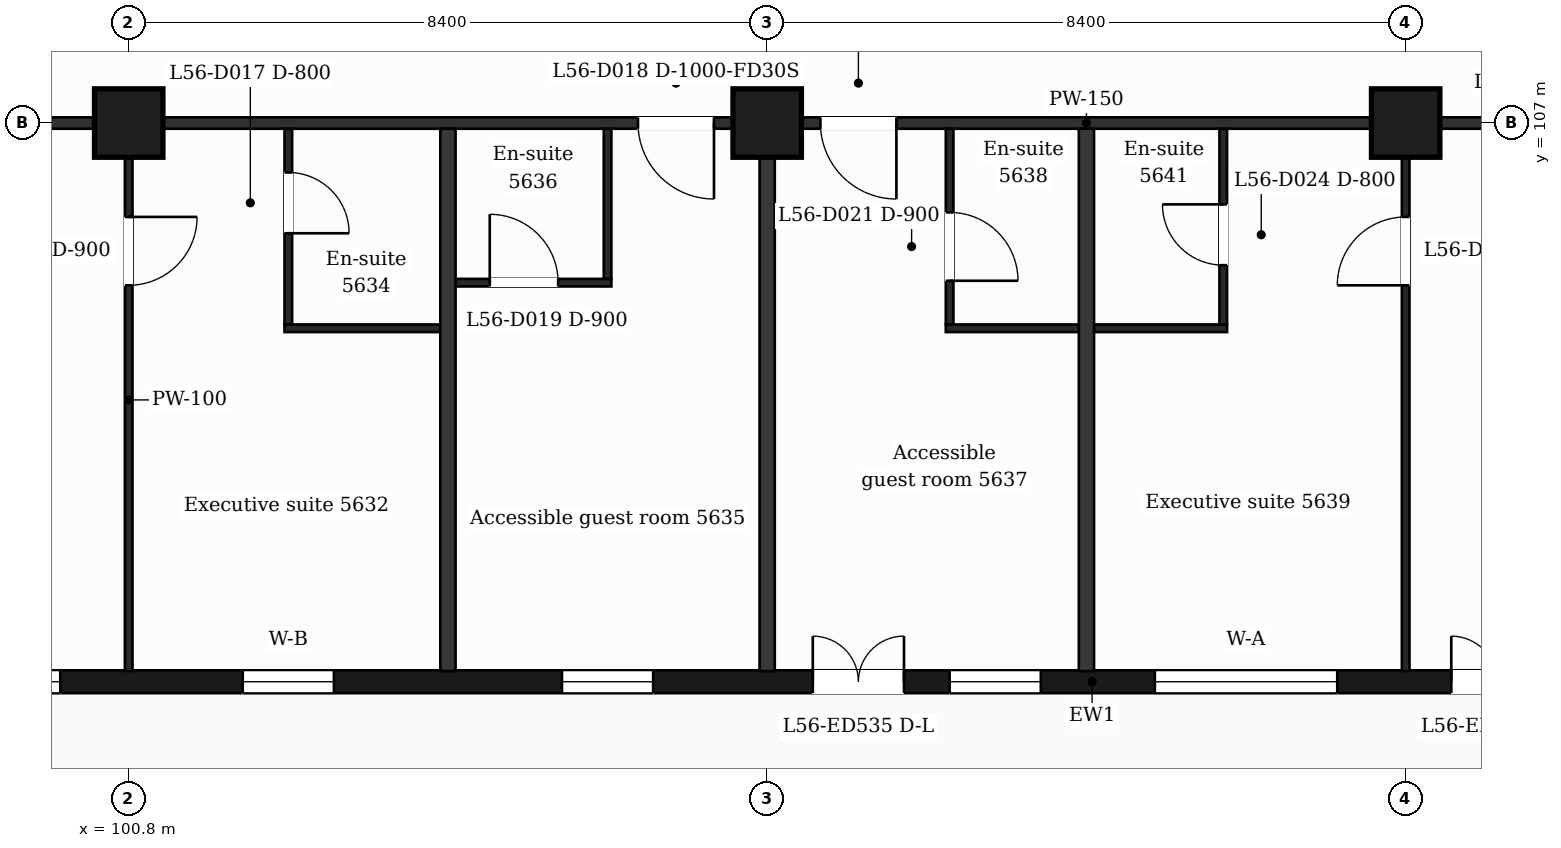
"""IFC4 building model, lengths in metres.
Left out: names, types, materials, properties, quantities, classifications, styles, units other than length and angle.
Written with IfcOpenShell. Run it as: python <this file> out.ifc"""

import sys

from ifc_helpers import new_model, si_unit, direction, frame, frame_2d, origin, origin_2d, place, context, subcontext, project, spatial, rectangle, extrude, element, fill, save


model = new_model("IFC4")
c1 = context("Model", 3, precision=1e-05, world=origin(), true_north=direction((0.0, 1.0)))
c2 = subcontext(c1, "Body", "Model", "MODEL_VIEW")
j1 = project(units=[si_unit("LENGTHUNIT", "METRE"), si_unit("PLANEANGLEUNIT", "RADIAN")], contexts=[c1])
p1 = place(None, origin())
s1 = spatial("IfcSite", under=j1, at=p1, CompositionType="ELEMENT")
p2 = place(p1, origin())
s2 = spatial("IfcBuilding", under=s1, at=p2, CompositionType="ELEMENT")
p3 = place(p2, frame((0.0, 0.0, 231.8)))
s3 = spatial("IfcBuildingStorey", under=s2, at=p3, CompositionType="ELEMENT", Elevation=231.8)
for number, where, z_axis, x_axis in (
    (1, (100.8, 107.0, 0.0), (0.0, 0.0, 1.0), (1.0, 0.0, 0.0)),
    (2, (109.2, 107.0, 0.0), (0.0, 0.0, 1.0), (1.0, 0.0, 0.0)),
    (3, (117.6, 107.0, 0.0), (0.0, 0.0, 1.0), (1.0, 0.0, 0.0)),
):
    element("IfcColumn", number, at=place(p3, frame(where, z_axis=z_axis, x_axis=x_axis)), inside=s3, PredefinedType="COLUMN", context=c2, shape_type="SweptSolid", body=[
        extrude(rectangle(XDim=0.9, YDim=0.9, at=origin_2d()), origin(), (0.0, 0.0, 1.0), 3.7),
    ])
p4 = place(p3, frame((89.85, 99.65, 0.0), z_axis=(0.0, 0.0, 1.0), x_axis=(1.0, 0.0, 0.0)))
e4 = element("IfcWall", 4, at=p4, inside=s3, PredefinedType="SOLIDWALL", context=c2, shape_type="SweptSolid", body=[
    extrude(rectangle(XDim=47.25, YDim=0.3, at=frame_2d((23.625, 0.0))), origin(), (0.0, 0.0, 1.0), 3.38),
])
p5 = place(p4, frame((0.725, 0.0, 0.9)))
e5 = element("IfcOpeningElement", 5, at=p5, cuts=e4, PredefinedType="OPENING", context=c2, shape_type="SweptSolid", body=[
    extrude(rectangle(XDim=1.2, YDim=2.1, at=frame_2d((0.6, 1.05))), frame((0.0, 0.16, 0.0), z_axis=(0.0, -1.0, 0.0), x_axis=(1.0, 0.0, 0.0)), (0.0, 0.0, 1.0), 0.32),
])
p6 = place(p4, frame((3.45, 0.0, 0.9)))
e6 = element("IfcOpeningElement", 6, at=p6, cuts=e4, PredefinedType="OPENING", context=c2, shape_type="SweptSolid", body=[
    extrude(rectangle(XDim=2.4, YDim=2.1, at=frame_2d((1.2, 1.05))), frame((0.0, 0.16, 0.0), z_axis=(0.0, -1.0, 0.0), x_axis=(1.0, 0.0, 0.0)), (0.0, 0.0, 1.0), 0.32),
])
p7 = place(p4, frame((7.65, 0.0, 0.9)))
e7 = element("IfcOpeningElement", 7, at=p7, cuts=e4, PredefinedType="OPENING", context=c2, shape_type="SweptSolid", body=[
    extrude(rectangle(XDim=2.4, YDim=2.1, at=frame_2d((1.2, 1.05))), frame((0.0, 0.16, 0.0), z_axis=(0.0, -1.0, 0.0), x_axis=(1.0, 0.0, 0.0)), (0.0, 0.0, 1.0), 0.32),
])
p8 = place(p4, frame((12.45, 0.0, 0.9)))
e8 = element("IfcOpeningElement", 8, at=p8, cuts=e4, PredefinedType="OPENING", context=c2, shape_type="SweptSolid", body=[
    extrude(rectangle(XDim=1.2, YDim=2.1, at=frame_2d((0.6, 1.05))), frame((0.0, 0.16, 0.0), z_axis=(0.0, -1.0, 0.0), x_axis=(1.0, 0.0, 0.0)), (0.0, 0.0, 1.0), 0.32),
])
p9 = place(p4, frame((16.65, 0.0, 0.9)))
e9 = element("IfcOpeningElement", 9, at=p9, cuts=e4, PredefinedType="OPENING", context=c2, shape_type="SweptSolid", body=[
    extrude(rectangle(XDim=1.2, YDim=2.1, at=frame_2d((0.6, 1.05))), frame((0.0, 0.16, 0.0), z_axis=(0.0, -1.0, 0.0), x_axis=(1.0, 0.0, 0.0)), (0.0, 0.0, 1.0), 0.32),
])
p10 = place(p4, frame((19.95, 0.0, 0.0)))
e10 = element("IfcOpeningElement", 10, at=p10, cuts=e4, PredefinedType="OPENING", context=c2, shape_type="SweptSolid", body=[
    extrude(rectangle(XDim=1.2, YDim=2.4, at=frame_2d((0.6, 1.2))), frame((0.0, 0.16, 0.0), z_axis=(0.0, -1.0, 0.0), x_axis=(1.0, 0.0, 0.0)), (0.0, 0.0, 1.0), 0.32),
])
p11 = place(p4, frame((21.75, 0.0, 0.9)))
e11 = element("IfcOpeningElement", 11, at=p11, cuts=e4, PredefinedType="OPENING", context=c2, shape_type="SweptSolid", body=[
    extrude(rectangle(XDim=1.2, YDim=2.1, at=frame_2d((0.6, 1.05))), frame((0.0, 0.16, 0.0), z_axis=(0.0, -1.0, 0.0), x_axis=(1.0, 0.0, 0.0)), (0.0, 0.0, 1.0), 0.32),
])
p12 = place(p4, frame((24.45, 0.0, 0.9)))
e12 = element("IfcOpeningElement", 12, at=p12, cuts=e4, PredefinedType="OPENING", context=c2, shape_type="SweptSolid", body=[
    extrude(rectangle(XDim=2.4, YDim=2.1, at=frame_2d((1.2, 1.05))), frame((0.0, 0.16, 0.0), z_axis=(0.0, -1.0, 0.0), x_axis=(1.0, 0.0, 0.0)), (0.0, 0.0, 1.0), 0.32),
])
p13 = place(p4, frame((28.35, 0.0, 0.0)))
e13 = element("IfcOpeningElement", 13, at=p13, cuts=e4, PredefinedType="OPENING", context=c2, shape_type="SweptSolid", body=[
    extrude(rectangle(XDim=1.2, YDim=2.4, at=frame_2d((0.6, 1.2))), frame((0.0, 0.16, 0.0), z_axis=(0.0, -1.0, 0.0), x_axis=(1.0, 0.0, 0.0)), (0.0, 0.0, 1.0), 0.32),
])
p14 = place(p4, frame((30.15, 0.0, 0.9)))
e14 = element("IfcOpeningElement", 14, at=p14, cuts=e4, PredefinedType="OPENING", context=c2, shape_type="SweptSolid", body=[
    extrude(rectangle(XDim=1.2, YDim=2.1, at=frame_2d((0.6, 1.05))), frame((0.0, 0.16, 0.0), z_axis=(0.0, -1.0, 0.0), x_axis=(1.0, 0.0, 0.0)), (0.0, 0.0, 1.0), 0.32),
])
p15 = place(p4, frame((32.85, 0.0, 0.9)))
e15 = element("IfcOpeningElement", 15, at=p15, cuts=e4, PredefinedType="OPENING", context=c2, shape_type="SweptSolid", body=[
    extrude(rectangle(XDim=2.4, YDim=2.1, at=frame_2d((1.2, 1.05))), frame((0.0, 0.16, 0.0), z_axis=(0.0, -1.0, 0.0), x_axis=(1.0, 0.0, 0.0)), (0.0, 0.0, 1.0), 0.32),
])
p16 = place(p4, frame((37.05, 0.0, 0.9)))
e16 = element("IfcOpeningElement", 16, at=p16, cuts=e4, PredefinedType="OPENING", context=c2, shape_type="SweptSolid", body=[
    extrude(rectangle(XDim=2.4, YDim=2.1, at=frame_2d((1.2, 1.05))), frame((0.0, 0.16, 0.0), z_axis=(0.0, -1.0, 0.0), x_axis=(1.0, 0.0, 0.0)), (0.0, 0.0, 1.0), 0.32),
])
p17 = place(p4, frame((41.85, 0.0, 0.9)))
e17 = element("IfcOpeningElement", 17, at=p17, cuts=e4, PredefinedType="OPENING", context=c2, shape_type="SweptSolid", body=[
    extrude(rectangle(XDim=1.2, YDim=2.1, at=frame_2d((0.6, 1.05))), frame((0.0, 0.16, 0.0), z_axis=(0.0, -1.0, 0.0), x_axis=(1.0, 0.0, 0.0)), (0.0, 0.0, 1.0), 0.32),
])
p18 = place(p4, frame((45.25, 0.0, 0.9)))
e18 = element("IfcOpeningElement", 18, at=p18, cuts=e4, PredefinedType="OPENING", context=c2, shape_type="SweptSolid", body=[
    extrude(rectangle(XDim=1.2, YDim=2.1, at=frame_2d((0.6, 1.05))), frame((0.0, 0.16, 0.0), z_axis=(0.0, -1.0, 0.0), x_axis=(1.0, 0.0, 0.0)), (0.0, 0.0, 1.0), 0.32),
])
p19 = place(p3, frame((102.85, 104.3, 0.0), z_axis=(0.0, 0.0, 1.0), x_axis=(1.0, 0.0, 0.0)))
e19 = element("IfcWall", 19, at=p19, inside=s3, PredefinedType="PARTITIONING", context=c2, shape_type="SweptSolid", body=[
    extrude(rectangle(XDim=2.15, YDim=0.1, at=frame_2d((1.075, 0.0))), origin(), (0.0, 0.0, 1.0), 3.38),
])
p20 = place(p3, frame((111.55, 104.3, 0.0), z_axis=(0.0, 0.0, 1.0), x_axis=(1.0, 0.0, 0.0)))
e20 = element("IfcWall", 20, at=p20, inside=s3, PredefinedType="PARTITIONING", context=c2, shape_type="SweptSolid", body=[
    extrude(rectangle(XDim=3.7, YDim=0.1, at=frame_2d((1.85, 0.0))), origin(), (0.0, 0.0, 1.0), 3.38),
])
p21 = place(p3, frame((105.0, 104.9, 0.0), z_axis=(0.0, 0.0, 1.0), x_axis=(1.0, 0.0, 0.0)))
e21 = element("IfcWall", 21, at=p21, inside=s3, PredefinedType="PARTITIONING", context=c2, shape_type="SweptSolid", body=[
    extrude(rectangle(XDim=2.15, YDim=0.1, at=frame_2d((1.075, 0.0))), origin(), (0.0, 0.0, 1.0), 3.38),
])
p22 = place(p21, frame((0.55, 0.0, 0.0)))
e22 = element("IfcOpeningElement", 22, at=p22, cuts=e21, PredefinedType="OPENING", context=c2, shape_type="SweptSolid", body=[
    extrude(rectangle(XDim=0.9, YDim=2.1, at=frame_2d((0.45, 1.05))), frame((0.0, 0.06, 0.0), z_axis=(0.0, -1.0, 0.0), x_axis=(1.0, 0.0, 0.0)), (0.0, 0.0, 1.0), 0.12),
])
p23 = place(p3, frame((87.018, 107.0, 0.0), z_axis=(0.0, 0.0, 1.0), x_axis=(1.0, 0.0, 0.0)))
e23 = element("IfcWall", 23, at=p23, inside=s3, PredefinedType="PARTITIONING", context=c2, shape_type="SweptSolid", body=[
    extrude(rectangle(XDim=52.765, YDim=0.15, at=frame_2d((26.382, 0.0))), origin(), (0.0, 0.0, 1.0), 3.38),
])
p24 = place(p23, frame((0.707, 0.0, 0.0)))
e24 = element("IfcOpeningElement", 24, at=p24, cuts=e23, PredefinedType="OPENING", context=c2, shape_type="SweptSolid", body=[
    extrude(rectangle(XDim=0.95, YDim=2.1, at=frame_2d((0.475, 1.05))), frame((0.0, 0.085, 0.0), z_axis=(0.0, -1.0, 0.0), x_axis=(1.0, 0.0, 0.0)), (0.0, 0.0, 1.0), 0.17),
])
p25 = place(p23, frame((8.412, 0.0, 0.0)))
e25 = element("IfcOpeningElement", 25, at=p25, cuts=e23, PredefinedType="OPENING", context=c2, shape_type="SweptSolid", body=[
    extrude(rectangle(XDim=1.0, YDim=2.1, at=frame_2d((0.5, 1.05))), frame((0.0, 0.085, 0.0), z_axis=(0.0, -1.0, 0.0), x_axis=(1.0, 0.0, 0.0)), (0.0, 0.0, 1.0), 0.17),
])
p26 = place(p23, frame((20.482, 0.0, 0.0)))
e26 = element("IfcOpeningElement", 26, at=p26, cuts=e23, PredefinedType="OPENING", context=c2, shape_type="SweptSolid", body=[
    extrude(rectangle(XDim=1.0, YDim=2.1, at=frame_2d((0.5, 1.05))), frame((0.0, 0.085, 0.0), z_axis=(0.0, -1.0, 0.0), x_axis=(1.0, 0.0, 0.0)), (0.0, 0.0, 1.0), 0.17),
])
p27 = place(p23, frame((22.882, 0.0, 0.0)))
e27 = element("IfcOpeningElement", 27, at=p27, cuts=e23, PredefinedType="OPENING", context=c2, shape_type="SweptSolid", body=[
    extrude(rectangle(XDim=1.0, YDim=2.1, at=frame_2d((0.5, 1.05))), frame((0.0, 0.085, 0.0), z_axis=(0.0, -1.0, 0.0), x_axis=(1.0, 0.0, 0.0)), (0.0, 0.0, 1.0), 0.17),
])
p28 = place(p23, frame((32.607, 0.0, 0.0)))
e28 = element("IfcOpeningElement", 28, at=p28, cuts=e23, PredefinedType="OPENING", context=c2, shape_type="SweptSolid", body=[
    extrude(rectangle(XDim=1.0, YDim=2.1, at=frame_2d((0.5, 1.05))), frame((0.0, 0.085, 0.0), z_axis=(0.0, -1.0, 0.0), x_axis=(1.0, 0.0, 0.0)), (0.0, 0.0, 1.0), 0.17),
])
p29 = place(p23, frame((39.707, 0.0, 0.0)))
e29 = element("IfcOpeningElement", 29, at=p29, cuts=e23, PredefinedType="OPENING", context=c2, shape_type="SweptSolid", body=[
    extrude(rectangle(XDim=0.95, YDim=2.1, at=frame_2d((0.475, 1.05))), frame((0.0, 0.085, 0.0), z_axis=(0.0, -1.0, 0.0), x_axis=(1.0, 0.0, 0.0)), (0.0, 0.0, 1.0), 0.17),
])
p30 = place(p23, frame((43.457, 0.0, 0.0)))
e30 = element("IfcOpeningElement", 30, at=p30, cuts=e23, PredefinedType="OPENING", context=c2, shape_type="SweptSolid", body=[
    extrude(rectangle(XDim=0.95, YDim=2.1, at=frame_2d((0.475, 1.05))), frame((0.0, 0.085, 0.0), z_axis=(0.0, -1.0, 0.0), x_axis=(1.0, 0.0, 0.0)), (0.0, 0.0, 1.0), 0.17),
])
p31 = place(p23, frame((49.285, 0.0, 0.0)))
e31 = element("IfcOpeningElement", 31, at=p31, cuts=e23, PredefinedType="OPENING", context=c2, shape_type="SweptSolid", body=[
    extrude(rectangle(XDim=0.95, YDim=2.1, at=frame_2d((0.475, 1.05))), frame((0.0, 0.085, 0.0), z_axis=(0.0, -1.0, 0.0), x_axis=(1.0, 0.0, 0.0)), (0.0, 0.0, 1.0), 0.17),
])
p32 = place(p3, frame((100.8, 99.79, 0.0), z_axis=(0.0, 0.0, 1.0), x_axis=(0.0, 1.0, 0.0)))
e32 = element("IfcWall", 32, at=p32, inside=s3, PredefinedType="PARTITIONING", context=c2, shape_type="SweptSolid", body=[
    extrude(rectangle(XDim=7.135, YDim=0.1, at=frame_2d((3.567, 0.0))), origin(), (0.0, 0.0, 1.0), 3.38),
])
p33 = place(p32, frame((5.075, 0.0, 0.0)))
e33 = element("IfcOpeningElement", 33, at=p33, cuts=e32, PredefinedType="OPENING", context=c2, shape_type="SweptSolid", body=[
    extrude(rectangle(XDim=0.9, YDim=2.1, at=frame_2d((0.45, 1.05))), frame((0.0, 0.06, 0.0), z_axis=(0.0, -1.0, 0.0), x_axis=(1.0, 0.0, 0.0)), (0.0, 0.0, 1.0), 0.12),
])
p34 = place(p3, frame((102.9, 104.35, 0.0), z_axis=(0.0, 0.0, 1.0), x_axis=(0.0, 1.0, 0.0)))
e34 = element("IfcWall", 34, at=p34, inside=s3, PredefinedType="PARTITIONING", context=c2, shape_type="SweptSolid", body=[
    extrude(rectangle(XDim=2.575, YDim=0.1, at=frame_2d((1.288, 0.0))), origin(), (0.0, 0.0, 1.0), 3.38),
])
p35 = place(p34, frame((1.2, 0.0, 0.0)))
e35 = element("IfcOpeningElement", 35, at=p35, cuts=e34, PredefinedType="OPENING", context=c2, shape_type="SweptSolid", body=[
    extrude(rectangle(XDim=0.8, YDim=2.1, at=frame_2d((0.4, 1.05))), frame((0.0, 0.06, 0.0), z_axis=(0.0, -1.0, 0.0), x_axis=(1.0, 0.0, 0.0)), (0.0, 0.0, 1.0), 0.12),
])
p36 = place(p3, frame((105.0, 99.79, 0.0), z_axis=(0.0, 0.0, 1.0), x_axis=(0.0, 1.0, 0.0)))
e36 = element("IfcWall", 36, at=p36, inside=s3, PredefinedType="PARTITIONING", context=c2, shape_type="SweptSolid", body=[
    extrude(rectangle(XDim=7.135, YDim=0.2, at=frame_2d((3.567, 0.0))), origin(), (0.0, 0.0, 1.0), 3.38),
])
p37 = place(p3, frame((107.1, 104.95, 0.0), z_axis=(0.0, 0.0, 1.0), x_axis=(0.0, 1.0, 0.0)))
e37 = element("IfcWall", 37, at=p37, inside=s3, PredefinedType="PARTITIONING", context=c2, shape_type="SweptSolid", body=[
    extrude(rectangle(XDim=1.975, YDim=0.1, at=frame_2d((0.988, 0.0))), origin(), (0.0, 0.0, 1.0), 3.38),
])
p38 = place(p3, frame((109.2, 99.79, 0.0), z_axis=(0.0, 0.0, 1.0), x_axis=(0.0, 1.0, 0.0)))
e38 = element("IfcWall", 38, at=p38, inside=s3, PredefinedType="PARTITIONING", context=c2, shape_type="SweptSolid", body=[
    extrude(rectangle(XDim=7.135, YDim=0.2, at=frame_2d((3.567, 0.0))), origin(), (0.0, 0.0, 1.0), 3.38),
])
p39 = place(p3, frame((111.6, 104.35, 0.0), z_axis=(0.0, 0.0, 1.0), x_axis=(0.0, 1.0, 0.0)))
e39 = element("IfcWall", 39, at=p39, inside=s3, PredefinedType="PARTITIONING", context=c2, shape_type="SweptSolid", body=[
    extrude(rectangle(XDim=2.575, YDim=0.1, at=frame_2d((1.288, 0.0))), origin(), (0.0, 0.0, 1.0), 3.38),
])
p40 = place(p39, frame((0.575, 0.0, 0.0)))
e40 = element("IfcOpeningElement", 40, at=p40, cuts=e39, PredefinedType="OPENING", context=c2, shape_type="SweptSolid", body=[
    extrude(rectangle(XDim=0.9, YDim=2.1, at=frame_2d((0.45, 1.05))), frame((0.0, 0.06, 0.0), z_axis=(0.0, -1.0, 0.0), x_axis=(1.0, 0.0, 0.0)), (0.0, 0.0, 1.0), 0.12),
])
p41 = place(p3, frame((113.4, 99.79, 0.0), z_axis=(0.0, 0.0, 1.0), x_axis=(0.0, 1.0, 0.0)))
e41 = element("IfcWall", 41, at=p41, inside=s3, PredefinedType="PARTITIONING", context=c2, shape_type="SweptSolid", body=[
    extrude(rectangle(XDim=7.135, YDim=0.2, at=frame_2d((3.567, 0.0))), origin(), (0.0, 0.0, 1.0), 3.38),
])
p42 = place(p3, frame((115.2, 104.35, 0.0), z_axis=(0.0, 0.0, 1.0), x_axis=(0.0, 1.0, 0.0)))
e42 = element("IfcWall", 42, at=p42, inside=s3, PredefinedType="PARTITIONING", context=c2, shape_type="SweptSolid", body=[
    extrude(rectangle(XDim=2.575, YDim=0.1, at=frame_2d((1.288, 0.0))), origin(), (0.0, 0.0, 1.0), 3.38),
])
p43 = place(p42, frame((0.78, 0.0, 0.0)))
e43 = element("IfcOpeningElement", 43, at=p43, cuts=e42, PredefinedType="OPENING", context=c2, shape_type="SweptSolid", body=[
    extrude(rectangle(XDim=0.8, YDim=2.1, at=frame_2d((0.4, 1.05))), frame((0.0, 0.06, 0.0), z_axis=(0.0, -1.0, 0.0), x_axis=(1.0, 0.0, 0.0)), (0.0, 0.0, 1.0), 0.12),
])
p44 = place(p3, frame((117.6, 99.79, 0.0), z_axis=(0.0, 0.0, 1.0), x_axis=(0.0, 1.0, 0.0)))
e44 = element("IfcWall", 44, at=p44, inside=s3, PredefinedType="PARTITIONING", context=c2, shape_type="SweptSolid", body=[
    extrude(rectangle(XDim=7.135, YDim=0.1, at=frame_2d((3.567, 0.0))), origin(), (0.0, 0.0, 1.0), 3.38),
])
p45 = place(p44, frame((5.075, 0.0, 0.0)))
e45 = element("IfcOpeningElement", 45, at=p45, cuts=e44, PredefinedType="OPENING", context=c2, shape_type="SweptSolid", body=[
    extrude(rectangle(XDim=0.9, YDim=2.1, at=frame_2d((0.45, 1.05))), frame((0.0, 0.06, 0.0), z_axis=(0.0, -1.0, 0.0), x_axis=(1.0, 0.0, 0.0)), (0.0, 0.0, 1.0), 0.12),
])
p46 = place(p7, origin())
e46 = element("IfcWindow", 46, at=p46, inside=s3, PartitioningType="SINGLE_PANEL", PredefinedType="WINDOW", context=c2, shape_type="SweptSolid", body=[
    extrude(rectangle(XDim=2.4, YDim=2.1, at=frame_2d((1.2, 1.05))), frame((0.0, 0.03, 0.0), z_axis=(0.0, -1.0, 0.0), x_axis=(1.0, 0.0, 0.0)), (0.0, 0.0, 1.0), 0.06),
])
fill(e7, e46)
p47 = place(p8, origin())
e47 = element("IfcWindow", 47, at=p47, inside=s3, PartitioningType="SINGLE_PANEL", PredefinedType="WINDOW", context=c2, shape_type="SweptSolid", body=[
    extrude(rectangle(XDim=1.2, YDim=2.1, at=frame_2d((0.6, 1.05))), frame((0.0, 0.03, 0.0), z_axis=(0.0, -1.0, 0.0), x_axis=(1.0, 0.0, 0.0)), (0.0, 0.0, 1.0), 0.06),
])
fill(e8, e47)
p48 = place(p9, origin())
e48 = element("IfcWindow", 48, at=p48, inside=s3, PartitioningType="SINGLE_PANEL", PredefinedType="WINDOW", context=c2, shape_type="SweptSolid", body=[
    extrude(rectangle(XDim=1.2, YDim=2.1, at=frame_2d((0.6, 1.05))), frame((0.0, 0.03, 0.0), z_axis=(0.0, -1.0, 0.0), x_axis=(1.0, 0.0, 0.0)), (0.0, 0.0, 1.0), 0.06),
])
fill(e9, e48)
p49 = place(p10, origin())
e49 = element("IfcDoor", 49, at=p49, inside=s3, OperationType="DOUBLE_DOOR_SINGLE_SWING", PredefinedType="DOOR", context=c2, shape_type="SweptSolid", body=[
    extrude(rectangle(XDim=1.2, YDim=2.4, at=frame_2d((0.6, 1.2))), frame((0.0, 0.025, 0.0), z_axis=(0.0, -1.0, 0.0), x_axis=(1.0, 0.0, 0.0)), (0.0, 0.0, 1.0), 0.05),
])
fill(e10, e49)
p50 = place(p11, origin())
e50 = element("IfcWindow", 50, at=p50, inside=s3, PartitioningType="SINGLE_PANEL", PredefinedType="WINDOW", context=c2, shape_type="SweptSolid", body=[
    extrude(rectangle(XDim=1.2, YDim=2.1, at=frame_2d((0.6, 1.05))), frame((0.0, 0.03, 0.0), z_axis=(0.0, -1.0, 0.0), x_axis=(1.0, 0.0, 0.0)), (0.0, 0.0, 1.0), 0.06),
])
fill(e11, e50)
p51 = place(p12, origin())
e51 = element("IfcWindow", 51, at=p51, inside=s3, PartitioningType="SINGLE_PANEL", PredefinedType="WINDOW", context=c2, shape_type="SweptSolid", body=[
    extrude(rectangle(XDim=2.4, YDim=2.1, at=frame_2d((1.2, 1.05))), frame((0.0, 0.03, 0.0), z_axis=(0.0, -1.0, 0.0), x_axis=(1.0, 0.0, 0.0)), (0.0, 0.0, 1.0), 0.06),
])
fill(e12, e51)
p52 = place(p13, origin())
e52 = element("IfcDoor", 52, at=p52, inside=s3, OperationType="DOUBLE_DOOR_SINGLE_SWING", PredefinedType="DOOR", context=c2, shape_type="SweptSolid", body=[
    extrude(rectangle(XDim=1.2, YDim=2.4, at=frame_2d((0.6, 1.2))), frame((0.0, 0.025, 0.0), z_axis=(0.0, -1.0, 0.0), x_axis=(1.0, 0.0, 0.0)), (0.0, 0.0, 1.0), 0.05),
])
fill(e13, e52)
p53 = place(p33, origin())
e53 = element("IfcDoor", 53, at=p53, inside=s3, OperationType="SINGLE_SWING_RIGHT", PredefinedType="DOOR", context=c2, shape_type="SweptSolid", body=[
    extrude(rectangle(XDim=0.9, YDim=2.1, at=frame_2d((0.45, 1.05))), frame((0.0, 0.025, 0.0), z_axis=(0.0, -1.0, 0.0), x_axis=(1.0, 0.0, 0.0)), (0.0, 0.0, 1.0), 0.05),
])
fill(e33, e53)
p54 = place(p35, origin())
e54 = element("IfcDoor", 54, at=p54, inside=s3, OperationType="SINGLE_SWING_LEFT", PredefinedType="DOOR", context=c2, shape_type="SweptSolid", body=[
    extrude(rectangle(XDim=0.8, YDim=2.1, at=frame_2d((0.4, 1.05))), frame((0.0, 0.025, 0.0), z_axis=(0.0, -1.0, 0.0), x_axis=(1.0, 0.0, 0.0)), (0.0, 0.0, 1.0), 0.05),
])
fill(e35, e54)
p55 = place(p26, origin())
e55 = element("IfcDoor", 55, at=p55, inside=s3, OperationType="SINGLE_SWING_RIGHT", PredefinedType="DOOR", context=c2, shape_type="SweptSolid", body=[
    extrude(rectangle(XDim=1.0, YDim=2.1, at=frame_2d((0.5, 1.05))), frame((0.0, 0.025, 0.0), z_axis=(0.0, -1.0, 0.0), x_axis=(1.0, 0.0, 0.0)), (0.0, 0.0, 1.0), 0.05),
])
fill(e26, e55)
p56 = place(p22, origin())
e56 = element("IfcDoor", 56, at=p56, inside=s3, OperationType="SINGLE_SWING_LEFT", PredefinedType="DOOR", context=c2, shape_type="SweptSolid", body=[
    extrude(rectangle(XDim=0.9, YDim=2.1, at=frame_2d((0.45, 1.05))), frame((0.0, 0.025, 0.0), z_axis=(0.0, -1.0, 0.0), x_axis=(1.0, 0.0, 0.0)), (0.0, 0.0, 1.0), 0.05),
])
fill(e22, e56)
p57 = place(p27, origin())
e57 = element("IfcDoor", 57, at=p57, inside=s3, OperationType="SINGLE_SWING_RIGHT", PredefinedType="DOOR", context=c2, shape_type="SweptSolid", body=[
    extrude(rectangle(XDim=1.0, YDim=2.1, at=frame_2d((0.5, 1.05))), frame((0.0, 0.025, 0.0), z_axis=(0.0, -1.0, 0.0), x_axis=(1.0, 0.0, 0.0)), (0.0, 0.0, 1.0), 0.05),
])
fill(e27, e57)
p58 = place(p40, origin())
e58 = element("IfcDoor", 58, at=p58, inside=s3, OperationType="SINGLE_SWING_LEFT", PredefinedType="DOOR", context=c2, shape_type="SweptSolid", body=[
    extrude(rectangle(XDim=0.9, YDim=2.1, at=frame_2d((0.45, 1.05))), frame((0.0, 0.025, 0.0), z_axis=(0.0, -1.0, 0.0), x_axis=(1.0, 0.0, 0.0)), (0.0, 0.0, 1.0), 0.05),
])
fill(e40, e58)
p59 = place(p45, origin())
e59 = element("IfcDoor", 59, at=p59, inside=s3, OperationType="SINGLE_SWING_LEFT", PredefinedType="DOOR", context=c2, shape_type="SweptSolid", body=[
    extrude(rectangle(XDim=0.9, YDim=2.1, at=frame_2d((0.45, 1.05))), frame((0.0, 0.025, 0.0), z_axis=(0.0, -1.0, 0.0), x_axis=(1.0, 0.0, 0.0)), (0.0, 0.0, 1.0), 0.05),
])
fill(e45, e59)
p60 = place(p43, origin())
e60 = element("IfcDoor", 60, at=p60, inside=s3, OperationType="SINGLE_SWING_RIGHT", PredefinedType="DOOR", context=c2, shape_type="SweptSolid", body=[
    extrude(rectangle(XDim=0.8, YDim=2.1, at=frame_2d((0.4, 1.05))), frame((0.0, 0.025, 0.0), z_axis=(0.0, -1.0, 0.0), x_axis=(1.0, 0.0, 0.0)), (0.0, 0.0, 1.0), 0.05),
])
fill(e43, e60)
save(model, sys.argv[1])
